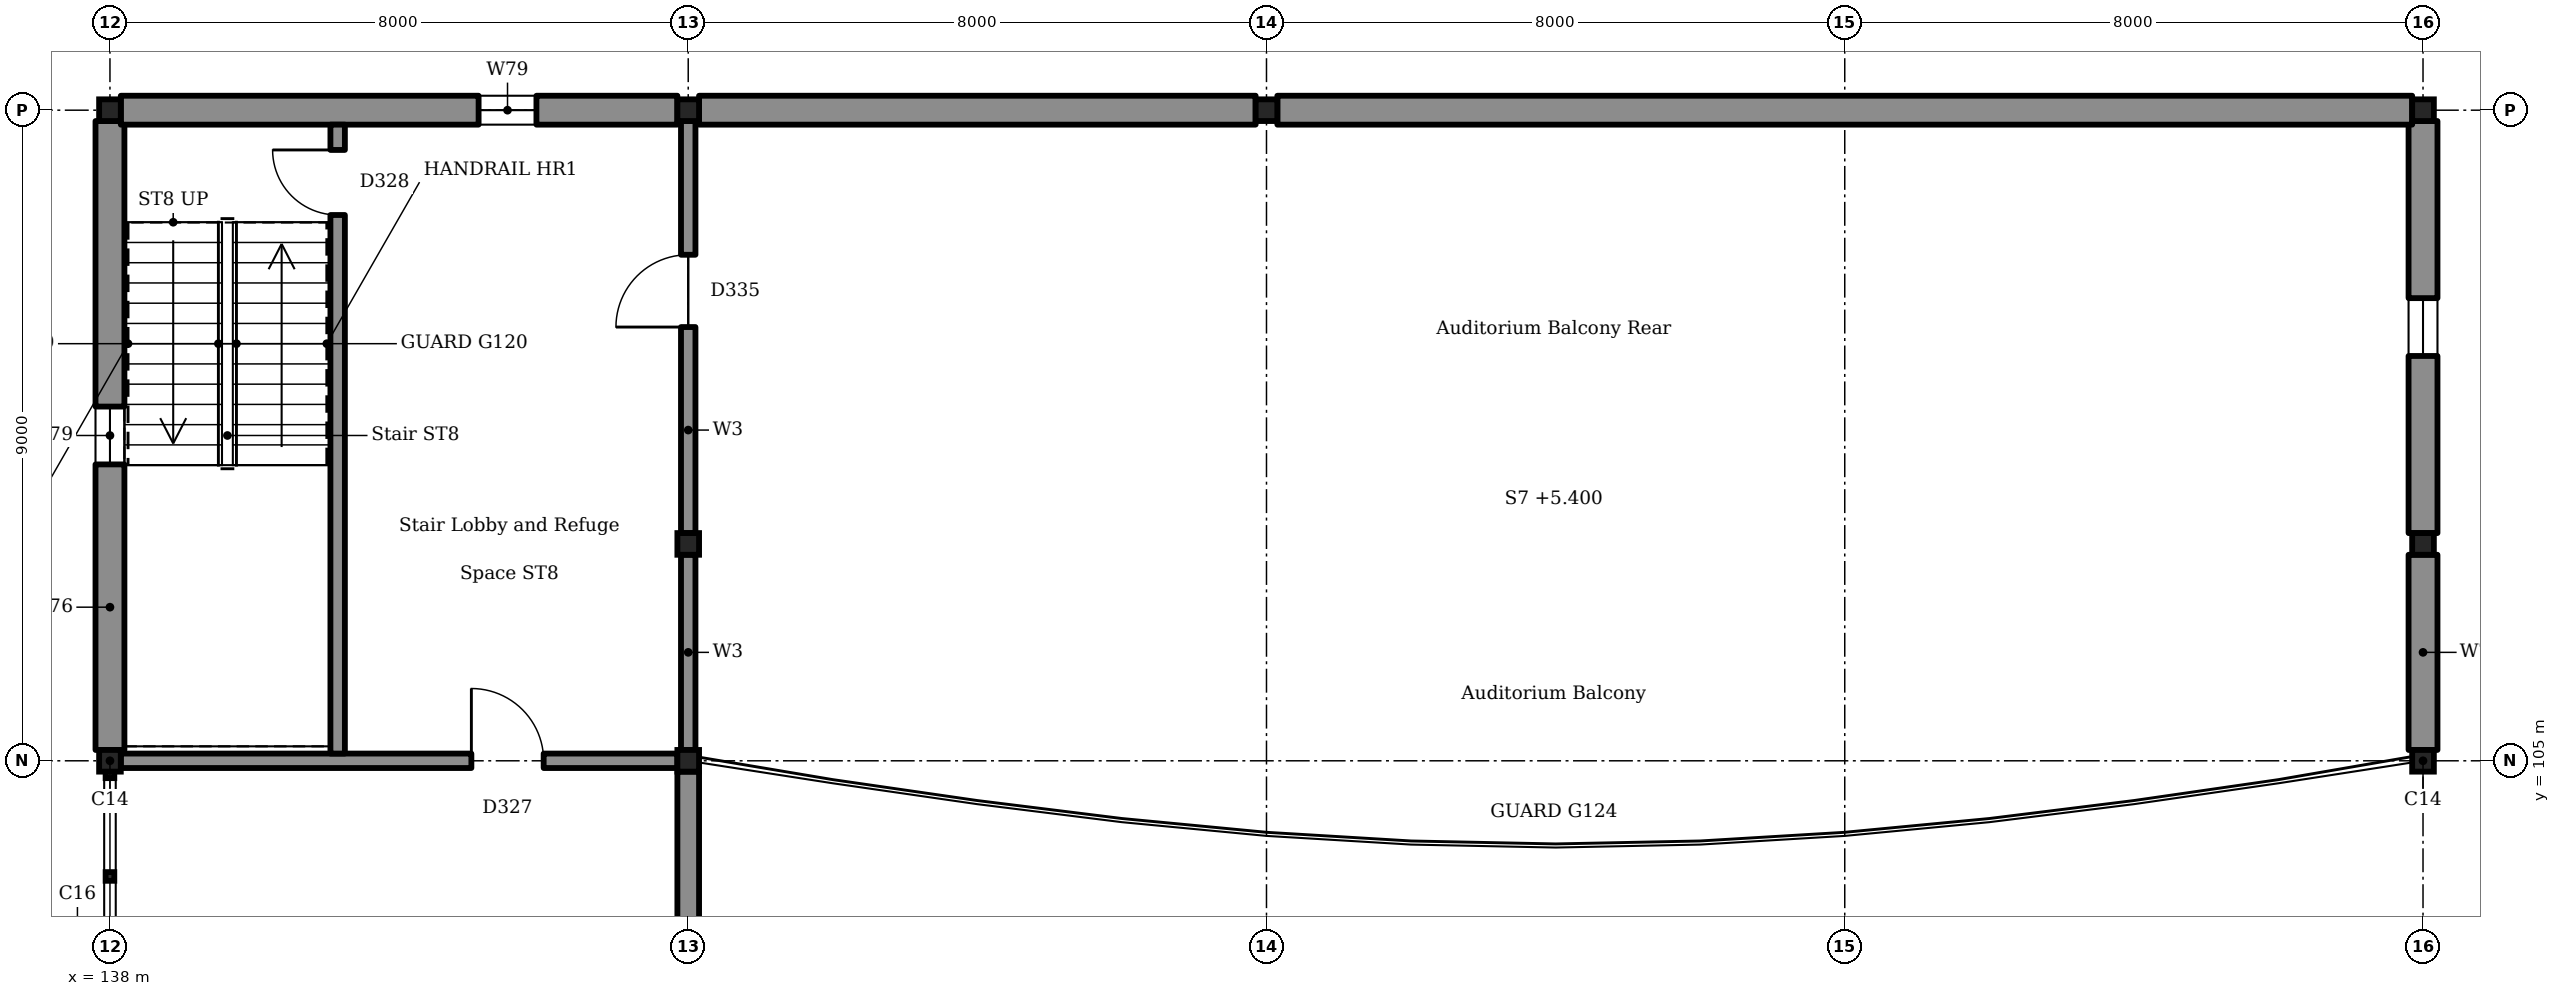
"""IFC4 building model, lengths in metres.
Left out: names, types, materials, properties, quantities, classifications, styles, units other than length and angle.
Written with IfcOpenShell. Run it as: python <this file> out.ifc"""

import sys

from ifc_helpers import new_model, si_unit, direction, frame, frame_2d, origin, origin_2d, place, context, subcontext, project, spatial, rectangle, i_section, extrude, element, fill, save


model = new_model("IFC4")
c1 = context("Model", 3, precision=1e-05, world=origin(), true_north=direction((0.0, 1.0)))
c2 = subcontext(c1, "Body", "Model", "MODEL_VIEW")
j1 = project(units=[si_unit("LENGTHUNIT", "METRE"), si_unit("PLANEANGLEUNIT", "RADIAN")], contexts=[c1])
p1 = place(None, origin())
s1 = spatial("IfcSite", under=j1, at=p1, CompositionType="ELEMENT")
p2 = place(p1, origin())
s2 = spatial("IfcBuilding", under=s1, at=p2, CompositionType="ELEMENT")
p3 = place(p2, frame((0.0, 0.0, 5.4)))
s3 = spatial("IfcBuildingStorey", under=s2, at=p3, CompositionType="ELEMENT", Elevation=5.4)
for number, where, z_axis, x_axis in (
    (1, (138.0, 105.0, 0.0), (0.0, 0.0, 1.0), (1.0, 0.0, 0.0)),
    (2, (170.0, 105.0, 0.0), (0.0, 0.0, 1.0), (1.0, 0.0, 0.0)),
    (3, (138.0, 114.0, 0.0), (0.0, 0.0, 1.0), (1.0, 0.0, 0.0)),
    (4, (170.0, 114.0, 0.0), (0.0, 0.0, 1.0), (1.0, 0.0, 0.0)),
    (5, (146.0, 108.0, 0.0), (0.0, 0.0, 1.0), (1.0, 0.0, 0.0)),
    (6, (146.0, 105.0, 0.0), (0.0, 0.0, 1.0), (1.0, 0.0, 0.0)),
    (7, (146.0, 114.0, 0.0), (0.0, 0.0, 1.0), (1.0, 0.0, 0.0)),
    (8, (154.0, 114.0, 0.0), (0.0, 0.0, 1.0), (1.0, 0.0, 0.0)),
    (9, (170.0, 108.0, 0.0), (0.0, 0.0, 1.0), (1.0, 0.0, 0.0)),
):
    element("IfcColumn", number, at=place(p3, frame(where, z_axis=z_axis, x_axis=x_axis)), inside=s3, PredefinedType="COLUMN", context=c2, shape_type="SweptSolid", body=[
        extrude(i_section(OverallWidth=0.3, OverallDepth=0.3, WebThickness=0.011, FlangeThickness=0.019, FilletRadius=0.027, at=origin_2d()), origin(), (0.0, 0.0, 1.0), 4.5),
    ])
p4 = place(p2, origin())
s4 = spatial("IfcBuildingStorey", under=s2, at=p4, CompositionType="ELEMENT", Elevation=0.0)
p5 = place(p4, frame((170.0, 96.15, 0.0), z_axis=(0.0, 0.0, 1.0), x_axis=(0.0, 1.0, 0.0)))
e10 = element("IfcWall", 10, at=p5, inside=s4, PredefinedType="SOLIDWALL", context=c2, shape_type="SweptSolid", body=[
    extrude(rectangle(XDim=8.7, YDim=0.4, at=frame_2d((4.35, 0.0))), origin(), (0.0, 0.0, 1.0), 13.95),
])
p6 = place(p3, frame((138.0, 105.15, 0.0), z_axis=(0.0, 0.0, 1.0), x_axis=(0.0, 1.0, 0.0)))
e11 = element("IfcWall", 11, at=p6, inside=s3, PredefinedType="SOLIDWALL", context=c2, shape_type="SweptSolid", body=[
    extrude(rectangle(XDim=8.7, YDim=0.4, at=frame_2d((4.35, 0.0))), origin(), (0.0, 0.0, 1.0), 4.25),
])
p7 = place(p6, frame((3.95, 0.0, 0.9)))
e12 = element("IfcOpeningElement", 12, at=p7, cuts=e11, PredefinedType="OPENING", context=c2, shape_type="SweptSolid", body=[
    extrude(rectangle(XDim=0.8, YDim=2.6, at=frame_2d((0.4, 1.3))), frame((0.0, 0.21, 0.0), z_axis=(0.0, -1.0, 0.0), x_axis=(1.0, 0.0, 0.0)), (0.0, 0.0, 1.0), 0.42),
])
p8 = place(p3, frame((170.0, 105.15, 0.0), z_axis=(0.0, 0.0, 1.0), x_axis=(0.0, 1.0, 0.0)))
e13 = element("IfcWall", 13, at=p8, inside=s3, PredefinedType="SOLIDWALL", context=c2, shape_type="SweptSolid", body=[
    extrude(rectangle(XDim=2.7, YDim=0.4, at=frame_2d((1.35, 0.0))), origin(), (0.0, 0.0, 1.0), 8.55),
])
p9 = place(p3, frame((170.0, 108.15, 0.0), z_axis=(0.0, 0.0, 1.0), x_axis=(0.0, 1.0, 0.0)))
e14 = element("IfcWall", 14, at=p9, inside=s3, PredefinedType="SOLIDWALL", context=c2, shape_type="SweptSolid", body=[
    extrude(rectangle(XDim=5.7, YDim=0.4, at=frame_2d((2.85, 0.0))), origin(), (0.0, 0.0, 1.0), 4.35),
])
p10 = place(p9, frame((2.45, 0.0, 0.9)))
e15 = element("IfcOpeningElement", 15, at=p10, cuts=e14, PredefinedType="OPENING", context=c2, shape_type="SweptSolid", body=[
    extrude(rectangle(XDim=0.8, YDim=2.6, at=frame_2d((0.4, 1.3))), frame((0.0, 0.21, 0.0), z_axis=(0.0, -1.0, 0.0), x_axis=(1.0, 0.0, 0.0)), (0.0, 0.0, 1.0), 0.42),
])
p11 = place(p3, frame((138.15, 114.0, 0.0), z_axis=(0.0, 0.0, 1.0), x_axis=(1.0, 0.0, 0.0)))
e16 = element("IfcWall", 16, at=p11, inside=s3, PredefinedType="SOLIDWALL", context=c2, shape_type="SweptSolid", body=[
    extrude(rectangle(XDim=7.7, YDim=0.4, at=frame_2d((3.85, 0.0))), origin(), (0.0, 0.0, 1.0), 4.25),
])
p12 = place(p11, frame((4.95, 0.0, 0.9)))
e17 = element("IfcOpeningElement", 17, at=p12, cuts=e16, PredefinedType="OPENING", context=c2, shape_type="SweptSolid", body=[
    extrude(rectangle(XDim=0.8, YDim=2.6, at=frame_2d((0.4, 1.3))), frame((0.0, 0.21, 0.0), z_axis=(0.0, -1.0, 0.0), x_axis=(1.0, 0.0, 0.0)), (0.0, 0.0, 1.0), 0.42),
])
p13 = place(p3, frame((146.15, 114.0, 0.0), z_axis=(0.0, 0.0, 1.0), x_axis=(1.0, 0.0, 0.0)))
e18 = element("IfcWall", 18, at=p13, inside=s3, PredefinedType="SOLIDWALL", context=c2, shape_type="SweptSolid", body=[
    extrude(rectangle(XDim=7.7, YDim=0.4, at=frame_2d((3.85, 0.0))), origin(), (0.0, 0.0, 1.0), 4.35),
])
p14 = place(p3, frame((154.15, 114.0, 0.0), z_axis=(0.0, 0.0, 1.0), x_axis=(1.0, 0.0, 0.0)))
e19 = element("IfcWall", 19, at=p14, inside=s3, PredefinedType="SOLIDWALL", context=c2, shape_type="SweptSolid", body=[
    extrude(rectangle(XDim=15.7, YDim=0.4, at=frame_2d((7.85, 0.0))), origin(), (0.0, 0.0, 1.0), 4.35),
])
p15 = place(p3, frame((146.0, 96.15, 0.0), z_axis=(0.0, 0.0, 1.0), x_axis=(0.0, 1.0, 0.0)))
e20 = element("IfcWall", 20, at=p15, inside=s3, PredefinedType="SOLIDWALL", context=c2, shape_type="SweptSolid", body=[
    extrude(rectangle(XDim=8.7, YDim=0.3, at=frame_2d((4.35, 0.0))), origin(), (0.0, 0.0, 1.0), 4.25),
])
p16 = place(p3, frame((146.0, 105.15, 0.0), z_axis=(0.0, 0.0, 1.0), x_axis=(0.0, 1.0, 0.0)))
e21 = element("IfcWall", 21, at=p16, inside=s3, PredefinedType="SOLIDWALL", context=c2, shape_type="SweptSolid", body=[
    extrude(rectangle(XDim=2.7, YDim=0.2, at=frame_2d((1.35, 0.0))), origin(), (0.0, 0.0, 1.0), 4.25),
])
p17 = place(p3, frame((146.0, 108.15, 0.0), z_axis=(0.0, 0.0, 1.0), x_axis=(0.0, 1.0, 0.0)))
e22 = element("IfcWall", 22, at=p17, inside=s3, PredefinedType="SOLIDWALL", context=c2, shape_type="SweptSolid", body=[
    extrude(rectangle(XDim=5.7, YDim=0.2, at=frame_2d((2.85, 0.0))), origin(), (0.0, 0.0, 1.0), 4.25),
])
p18 = place(p17, frame((2.85, 0.0, 0.0)))
e23 = element("IfcOpeningElement", 23, at=p18, cuts=e22, PredefinedType="OPENING", context=c2, shape_type="SweptSolid", body=[
    extrude(rectangle(XDim=1.0, YDim=2.1, at=frame_2d((0.5, 1.05))), frame((0.0, 0.11, 0.0), z_axis=(0.0, -1.0, 0.0), x_axis=(1.0, 0.0, 0.0)), (0.0, 0.0, 1.0), 0.22),
])
p19 = place(p3, frame((138.15, 105.0, 0.0), z_axis=(0.0, 0.0, 1.0), x_axis=(1.0, 0.0, 0.0)))
e24 = element("IfcWall", 24, at=p19, inside=s3, PredefinedType="SOLIDWALL", context=c2, shape_type="SweptSolid", body=[
    extrude(rectangle(XDim=7.7, YDim=0.2, at=frame_2d((3.85, 0.0))), origin(), (0.0, 0.0, 1.0), 4.25),
])
p20 = place(p19, frame((4.85, 0.0, 0.0)))
e25 = element("IfcOpeningElement", 25, at=p20, cuts=e24, PredefinedType="OPENING", context=c2, shape_type="SweptSolid", body=[
    extrude(rectangle(XDim=1.0, YDim=2.1, at=frame_2d((0.5, 1.05))), frame((0.0, 0.11, 0.0), z_axis=(0.0, -1.0, 0.0), x_axis=(1.0, 0.0, 0.0)), (0.0, 0.0, 1.0), 0.22),
])
p21 = place(p3, frame((141.15, 105.1, 0.0), z_axis=(0.0, 0.0, 1.0), x_axis=(0.0, 1.0, 0.0)))
e26 = element("IfcWall", 26, at=p21, inside=s3, PredefinedType="SOLIDWALL", context=c2, shape_type="SweptSolid", body=[
    extrude(rectangle(XDim=8.7, YDim=0.2, at=frame_2d((4.35, 0.0))), origin(), (0.0, 0.0, 1.0), 4.25),
])
p22 = place(p21, frame((7.45, 0.0, 0.0)))
e27 = element("IfcOpeningElement", 27, at=p22, cuts=e26, PredefinedType="OPENING", context=c2, shape_type="SweptSolid", body=[
    extrude(rectangle(XDim=0.9, YDim=2.1, at=frame_2d((0.45, 1.05))), frame((0.0, 0.11, 0.0), z_axis=(0.0, -1.0, 0.0), x_axis=(1.0, 0.0, 0.0)), (0.0, 0.0, 1.0), 0.22),
])
p23 = place(p7, origin())
e28 = element("IfcWindow", 28, at=p23, inside=s3, PartitioningType="SINGLE_PANEL", PredefinedType="WINDOW", context=c2, shape_type="SweptSolid", body=[
    extrude(rectangle(XDim=0.8, YDim=2.6, at=frame_2d((0.4, 1.3))), frame((0.0, 0.03, 0.0), z_axis=(0.0, -1.0, 0.0), x_axis=(1.0, 0.0, 0.0)), (0.0, 0.0, 1.0), 0.06),
])
fill(e12, e28)
p24 = place(p12, origin())
e29 = element("IfcWindow", 29, at=p24, inside=s3, PartitioningType="SINGLE_PANEL", PredefinedType="WINDOW", context=c2, shape_type="SweptSolid", body=[
    extrude(rectangle(XDim=0.8, YDim=2.6, at=frame_2d((0.4, 1.3))), frame((0.0, 0.03, 0.0), z_axis=(0.0, -1.0, 0.0), x_axis=(1.0, 0.0, 0.0)), (0.0, 0.0, 1.0), 0.06),
])
fill(e17, e29)
p25 = place(p10, origin())
e30 = element("IfcWindow", 30, at=p25, inside=s3, PartitioningType="SINGLE_PANEL", PredefinedType="WINDOW", context=c2, shape_type="SweptSolid", body=[
    extrude(rectangle(XDim=0.8, YDim=2.6, at=frame_2d((0.4, 1.3))), frame((0.0, 0.03, 0.0), z_axis=(0.0, -1.0, 0.0), x_axis=(1.0, 0.0, 0.0)), (0.0, 0.0, 1.0), 0.06),
])
fill(e15, e30)
p26 = place(p20, origin())
e31 = element("IfcDoor", 31, at=p26, inside=s3, OperationType="SINGLE_SWING_RIGHT", PredefinedType="DOOR", context=c2, shape_type="SweptSolid", body=[
    extrude(rectangle(XDim=1.0, YDim=2.1, at=frame_2d((0.5, 1.05))), frame((0.0, 0.025, 0.0), z_axis=(0.0, -1.0, 0.0), x_axis=(1.0, 0.0, 0.0)), (0.0, 0.0, 1.0), 0.05),
])
fill(e25, e31)
p27 = place(p22, origin())
e32 = element("IfcDoor", 32, at=p27, inside=s3, OperationType="SINGLE_SWING_LEFT", PredefinedType="DOOR", context=c2, shape_type="SweptSolid", body=[
    extrude(rectangle(XDim=0.9, YDim=2.1, at=frame_2d((0.45, 1.05))), frame((0.0, 0.025, 0.0), z_axis=(0.0, -1.0, 0.0), x_axis=(1.0, 0.0, 0.0)), (0.0, 0.0, 1.0), 0.05),
])
fill(e27, e32)
p28 = place(p18, origin())
e33 = element("IfcDoor", 33, at=p28, inside=s3, OperationType="SINGLE_SWING_RIGHT", PredefinedType="DOOR", context=c2, shape_type="SweptSolid", body=[
    extrude(rectangle(XDim=1.0, YDim=2.1, at=frame_2d((0.5, 1.05))), frame((0.0, 0.025, 0.0), z_axis=(0.0, -1.0, 0.0), x_axis=(1.0, 0.0, 0.0)), (0.0, 0.0, 1.0), 0.05),
])
fill(e23, e33)
save(model, sys.argv[1])
